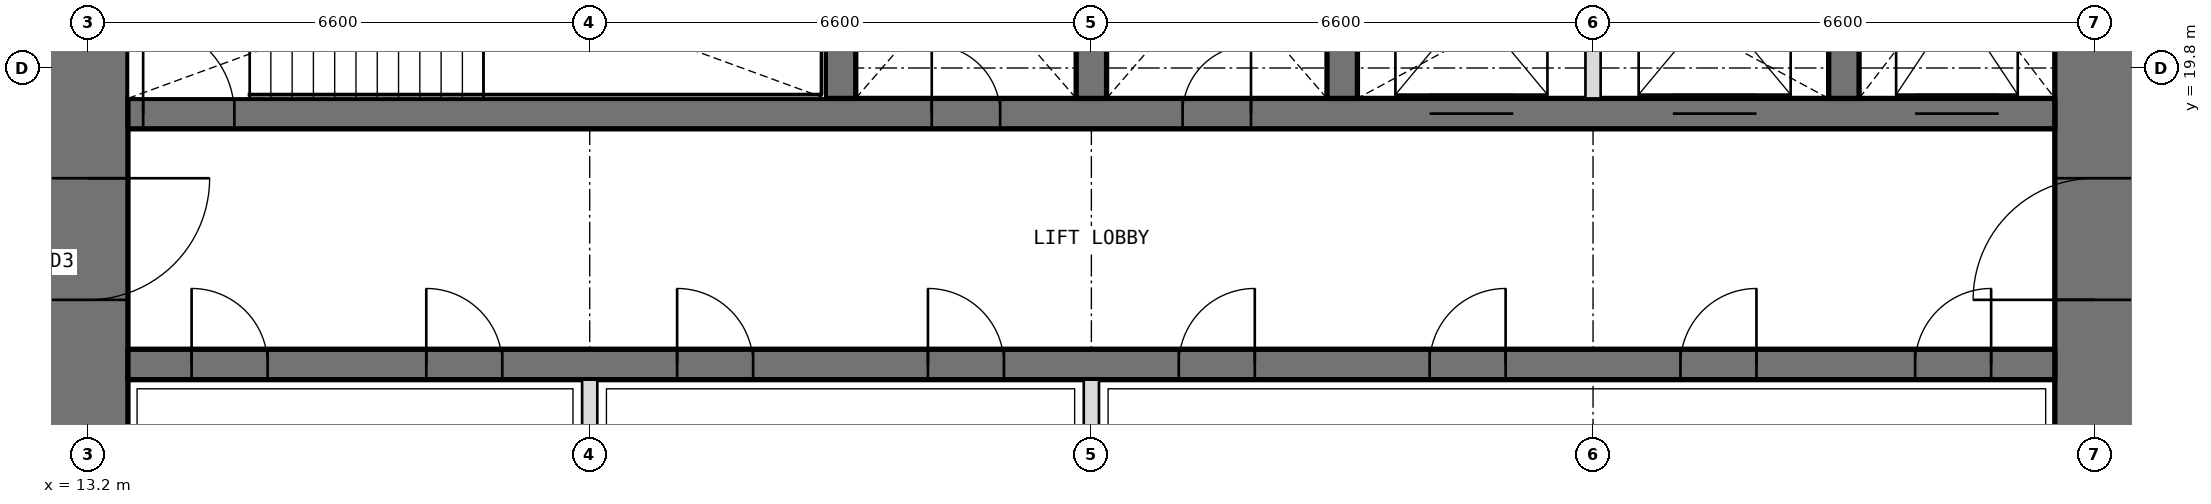
"""IFC4 building model, lengths in metres.
Left out: names, types, materials, properties, quantities, classifications, styles, units other than length and angle.
Written with IfcOpenShell. Run it as: python <this file> out.ifc"""

import sys

from ifc_helpers import new_model, si_unit, direction, frame, frame_2d, origin, place, context, subcontext, project, spatial, rectangle, extrude, element, fill, save


model = new_model("IFC4")
c1 = context("Model", 3, precision=1e-05, world=origin(), true_north=direction((0.0, 1.0)))
c2 = subcontext(c1, "Body", "Model", "MODEL_VIEW")
j1 = project(units=[si_unit("LENGTHUNIT", "METRE"), si_unit("PLANEANGLEUNIT", "RADIAN")], contexts=[c1])
p1 = place(None, origin())
s1 = spatial("IfcSite", under=j1, at=p1, CompositionType="ELEMENT")
p2 = place(p1, origin())
s2 = spatial("IfcBuilding", under=s1, at=p2, CompositionType="ELEMENT")
p3 = place(p2, frame((0.0, 0.0, 189.3)))
s3 = spatial("IfcBuildingStorey", under=s2, at=p3, CompositionType="ELEMENT", Elevation=189.3)
p4 = place(p3, frame((39.6, 13.725, 0.0), z_axis=(0.0, 0.0, 1.0), x_axis=(0.0, 1.0, 0.0)))
e1 = element("IfcWall", 1, at=p4, inside=s3, PredefinedType="SHEAR", context=c2, shape_type="SweptSolid", body=[
    extrude(rectangle(XDim=18.75, YDim=1.05, at=frame_2d((9.375, 0.0))), origin(), (0.0, 0.0, 1.0), 4.2),
])
p5 = place(p4, frame((3.025, 0.0, 0.0)))
e2 = element("IfcOpeningElement", 2, at=p5, cuts=e1, PredefinedType="OPENING", context=c2, shape_type="SweptSolid", body=[
    extrude(rectangle(XDim=1.6, YDim=2.1, at=frame_2d((0.8, 1.05))), frame((0.0, 0.535, 0.0), z_axis=(0.0, -1.0, 0.0), x_axis=(1.0, 0.0, 0.0)), (0.0, 0.0, 1.0), 1.07),
])
p6 = place(p4, frame((13.825, 0.0, 0.0)))
e3 = element("IfcOpeningElement", 3, at=p6, cuts=e1, PredefinedType="OPENING", context=c2, shape_type="SweptSolid", body=[
    extrude(rectangle(XDim=1.6, YDim=2.1, at=frame_2d((0.8, 1.05))), frame((0.0, 0.535, 0.0), z_axis=(0.0, -1.0, 0.0), x_axis=(1.0, 0.0, 0.0)), (0.0, 0.0, 1.0), 1.07),
])
p7 = place(p3, frame((13.2, 32.475, 0.0), z_axis=(0.0, 0.0, 1.0), x_axis=(0.0, -1.0, 0.0)))
e4 = element("IfcWall", 4, at=p7, inside=s3, PredefinedType="SHEAR", context=c2, shape_type="SweptSolid", body=[
    extrude(rectangle(XDim=18.75, YDim=1.05, at=frame_2d((9.375, 0.0))), origin(), (0.0, 0.0, 1.0), 4.2),
])
p8 = place(p7, frame((14.125, 0.0, 0.0)))
e5 = element("IfcOpeningElement", 5, at=p8, cuts=e4, PredefinedType="OPENING", context=c2, shape_type="SweptSolid", body=[
    extrude(rectangle(XDim=1.6, YDim=2.1, at=frame_2d((0.8, 1.05))), frame((0.0, 0.535, 0.0), z_axis=(0.0, -1.0, 0.0), x_axis=(1.0, 0.0, 0.0)), (0.0, 0.0, 1.0), 1.07),
])
p9 = place(p7, frame((3.325, 0.0, 0.0)))
e6 = element("IfcOpeningElement", 6, at=p9, cuts=e4, PredefinedType="OPENING", context=c2, shape_type="SweptSolid", body=[
    extrude(rectangle(XDim=1.6, YDim=2.1, at=frame_2d((0.8, 1.05))), frame((0.0, 0.535, 0.0), z_axis=(0.0, -1.0, 0.0), x_axis=(1.0, 0.0, 0.0)), (0.0, 0.0, 1.0), 1.07),
])
p10 = place(p3, frame((13.725, 15.9, 0.0), z_axis=(0.0, 0.0, 1.0), x_axis=(1.0, 0.0, 0.0)))
e7 = element("IfcWall", 7, at=p10, inside=s3, PredefinedType="SHEAR", context=c2, shape_type="SweptSolid", body=[
    extrude(rectangle(XDim=25.35, YDim=0.4, at=frame_2d((12.675, 0.0))), origin(), (0.0, 0.0, 1.0), 4.2),
])
p11 = place(p10, frame((0.837, 0.0, 0.0)))
e8 = element("IfcOpeningElement", 8, at=p11, cuts=e7, PredefinedType="OPENING", context=c2, shape_type="SweptSolid", body=[
    extrude(rectangle(XDim=1.0, YDim=2.1, at=frame_2d((0.5, 1.05))), frame((0.0, 0.21, 0.0), z_axis=(0.0, -1.0, 0.0), x_axis=(1.0, 0.0, 0.0)), (0.0, 0.0, 1.0), 0.42),
])
p12 = place(p10, frame((3.925, 0.0, 0.0)))
e9 = element("IfcOpeningElement", 9, at=p12, cuts=e7, PredefinedType="OPENING", context=c2, shape_type="SweptSolid", body=[
    extrude(rectangle(XDim=1.0, YDim=2.1, at=frame_2d((0.5, 1.05))), frame((0.0, 0.21, 0.0), z_axis=(0.0, -1.0, 0.0), x_axis=(1.0, 0.0, 0.0)), (0.0, 0.0, 1.0), 0.42),
])
p13 = place(p10, frame((7.225, 0.0, 0.0)))
e10 = element("IfcOpeningElement", 10, at=p13, cuts=e7, PredefinedType="OPENING", context=c2, shape_type="SweptSolid", body=[
    extrude(rectangle(XDim=1.0, YDim=2.1, at=frame_2d((0.5, 1.05))), frame((0.0, 0.21, 0.0), z_axis=(0.0, -1.0, 0.0), x_axis=(1.0, 0.0, 0.0)), (0.0, 0.0, 1.0), 0.42),
])
p14 = place(p10, frame((10.525, 0.0, 0.0)))
e11 = element("IfcOpeningElement", 11, at=p14, cuts=e7, PredefinedType="OPENING", context=c2, shape_type="SweptSolid", body=[
    extrude(rectangle(XDim=1.0, YDim=2.1, at=frame_2d((0.5, 1.05))), frame((0.0, 0.21, 0.0), z_axis=(0.0, -1.0, 0.0), x_axis=(1.0, 0.0, 0.0)), (0.0, 0.0, 1.0), 0.42),
])
p15 = place(p10, frame((13.825, 0.0, 0.0)))
e12 = element("IfcOpeningElement", 12, at=p15, cuts=e7, PredefinedType="OPENING", context=c2, shape_type="SweptSolid", body=[
    extrude(rectangle(XDim=1.0, YDim=2.1, at=frame_2d((0.5, 1.05))), frame((0.0, 0.21, 0.0), z_axis=(0.0, -1.0, 0.0), x_axis=(1.0, 0.0, 0.0)), (0.0, 0.0, 1.0), 0.42),
])
p16 = place(p10, frame((17.125, 0.0, 0.0)))
e13 = element("IfcOpeningElement", 13, at=p16, cuts=e7, PredefinedType="OPENING", context=c2, shape_type="SweptSolid", body=[
    extrude(rectangle(XDim=1.0, YDim=2.1, at=frame_2d((0.5, 1.05))), frame((0.0, 0.21, 0.0), z_axis=(0.0, -1.0, 0.0), x_axis=(1.0, 0.0, 0.0)), (0.0, 0.0, 1.0), 0.42),
])
p17 = place(p10, frame((20.425, 0.0, 0.0)))
e14 = element("IfcOpeningElement", 14, at=p17, cuts=e7, PredefinedType="OPENING", context=c2, shape_type="SweptSolid", body=[
    extrude(rectangle(XDim=1.0, YDim=2.1, at=frame_2d((0.5, 1.05))), frame((0.0, 0.21, 0.0), z_axis=(0.0, -1.0, 0.0), x_axis=(1.0, 0.0, 0.0)), (0.0, 0.0, 1.0), 0.42),
])
p18 = place(p10, frame((23.512, 0.0, 0.0)))
e15 = element("IfcOpeningElement", 15, at=p18, cuts=e7, PredefinedType="OPENING", context=c2, shape_type="SweptSolid", body=[
    extrude(rectangle(XDim=1.0, YDim=2.1, at=frame_2d((0.5, 1.05))), frame((0.0, 0.21, 0.0), z_axis=(0.0, -1.0, 0.0), x_axis=(1.0, 0.0, 0.0)), (0.0, 0.0, 1.0), 0.42),
])
p19 = place(p3, frame((13.725, 19.2, 0.0), z_axis=(0.0, 0.0, 1.0), x_axis=(1.0, 0.0, 0.0)))
e16 = element("IfcWall", 16, at=p19, inside=s3, PredefinedType="SHEAR", context=c2, shape_type="SweptSolid", body=[
    extrude(rectangle(XDim=25.35, YDim=0.4, at=frame_2d((12.675, 0.0))), origin(), (0.0, 0.0, 1.0), 4.2),
])
p20 = place(p19, frame((10.575, 0.0, 0.0)))
e17 = element("IfcOpeningElement", 17, at=p20, cuts=e16, PredefinedType="OPENING", context=c2, shape_type="SweptSolid", body=[
    extrude(rectangle(XDim=0.9, YDim=2.1, at=frame_2d((0.45, 1.05))), frame((0.0, 0.21, 0.0), z_axis=(0.0, -1.0, 0.0), x_axis=(1.0, 0.0, 0.0)), (0.0, 0.0, 1.0), 0.42),
])
p21 = place(p19, frame((13.875, 0.0, 0.0)))
e18 = element("IfcOpeningElement", 18, at=p21, cuts=e16, PredefinedType="OPENING", context=c2, shape_type="SweptSolid", body=[
    extrude(rectangle(XDim=0.9, YDim=2.1, at=frame_2d((0.45, 1.05))), frame((0.0, 0.21, 0.0), z_axis=(0.0, -1.0, 0.0), x_axis=(1.0, 0.0, 0.0)), (0.0, 0.0, 1.0), 0.42),
])
p22 = place(p19, frame((0.2, 0.0, 0.0)))
e19 = element("IfcOpeningElement", 19, at=p22, cuts=e16, PredefinedType="OPENING", context=c2, shape_type="SweptSolid", body=[
    extrude(rectangle(XDim=1.2, YDim=2.1, at=frame_2d((0.6, 1.05))), frame((0.0, 0.21, 0.0), z_axis=(0.0, -1.0, 0.0), x_axis=(1.0, 0.0, 0.0)), (0.0, 0.0, 1.0), 0.42),
])
p23 = place(p19, frame((23.512, 0.0, 0.0)))
e20 = element("IfcOpeningElement", 20, at=p23, cuts=e16, PredefinedType="OPENING", context=c2, shape_type="SweptSolid", body=[
    extrude(rectangle(XDim=1.1, YDim=2.1, at=frame_2d((0.55, 1.05))), frame((0.0, 0.21, 0.0), z_axis=(0.0, -1.0, 0.0), x_axis=(1.0, 0.0, 0.0)), (0.0, 0.0, 1.0), 0.42),
])
p24 = place(p19, frame((17.125, 0.0, 0.0)))
e21 = element("IfcOpeningElement", 21, at=p24, cuts=e16, PredefinedType="OPENING", context=c2, shape_type="SweptSolid", body=[
    extrude(rectangle(XDim=1.1, YDim=2.1, at=frame_2d((0.55, 1.05))), frame((0.0, 0.21, 0.0), z_axis=(0.0, -1.0, 0.0), x_axis=(1.0, 0.0, 0.0)), (0.0, 0.0, 1.0), 0.42),
])
p25 = place(p19, frame((20.325, 0.0, 0.0)))
e22 = element("IfcOpeningElement", 22, at=p25, cuts=e16, PredefinedType="OPENING", context=c2, shape_type="SweptSolid", body=[
    extrude(rectangle(XDim=1.1, YDim=2.1, at=frame_2d((0.55, 1.05))), frame((0.0, 0.21, 0.0), z_axis=(0.0, -1.0, 0.0), x_axis=(1.0, 0.0, 0.0)), (0.0, 0.0, 1.0), 0.42),
])
for number, where, z_axis, x_axis in (
    (23, (23.1, 19.4, 0.0), (0.0, 0.0, 1.0), (0.0, 1.0, 0.0)),
    (24, (26.4, 19.4, 0.0), (0.0, 0.0, 1.0), (0.0, 1.0, 0.0)),
    (25, (29.7, 19.4, 0.0), (0.0, 0.0, 1.0), (0.0, 1.0, 0.0)),
    (26, (36.3, 19.4, 0.0), (0.0, 0.0, 1.0), (0.0, 1.0, 0.0)),
):
    element("IfcWall", number, at=place(p3, frame(where, z_axis=z_axis, x_axis=x_axis)), inside=s3, PredefinedType="SHEAR", context=c2, shape_type="SweptSolid", body=[
        extrude(rectangle(XDim=3.35, YDim=0.4, at=frame_2d((1.675, 0.0))), origin(), (0.0, 0.0, 1.0), 4.2),
    ])
for number, where, z_axis, x_axis in (
    (27, (19.8, 13.725, 0.0), (0.0, 0.0, 1.0), (0.0, 1.0, 0.0)),
    (28, (26.4, 13.725, 0.0), (0.0, 0.0, 1.0), (0.0, 1.0, 0.0)),
):
    element("IfcWall", number, at=place(p3, frame(where, z_axis=z_axis, x_axis=x_axis)), inside=s3, PredefinedType="PARTITIONING", context=c2, shape_type="SweptSolid", body=[
        extrude(rectangle(XDim=1.975, YDim=0.2, at=frame_2d((0.987, 0.0))), origin(), (0.0, 0.0, 1.0), 4.2),
    ])
p26 = place(p3, frame((33.0, 19.4, 0.0), z_axis=(0.0, 0.0, 1.0), x_axis=(0.0, 1.0, 0.0)))
e29 = element("IfcWall", 29, at=p26, inside=s3, PredefinedType="PARTITIONING", context=c2, shape_type="SweptSolid", body=[
    extrude(rectangle(XDim=3.35, YDim=0.2, at=frame_2d((1.675, 0.0))), origin(), (0.0, 0.0, 1.0), 4.2),
])
p27 = place(p20, origin())
e30 = element("IfcDoor", 30, at=p27, inside=s3, OperationType="SINGLE_SWING_LEFT", PredefinedType="DOOR", context=c2, shape_type="SweptSolid", body=[
    extrude(rectangle(XDim=0.9, YDim=2.1, at=frame_2d((0.45, 1.05))), frame((0.0, 0.025, 0.0), z_axis=(0.0, -1.0, 0.0), x_axis=(1.0, 0.0, 0.0)), (0.0, 0.0, 1.0), 0.05),
])
fill(e17, e30)
p28 = place(p21, origin())
e31 = element("IfcDoor", 31, at=p28, inside=s3, OperationType="SINGLE_SWING_RIGHT", PredefinedType="DOOR", context=c2, shape_type="SweptSolid", body=[
    extrude(rectangle(XDim=0.9, YDim=2.1, at=frame_2d((0.45, 1.05))), frame((0.0, 0.025, 0.0), z_axis=(0.0, -1.0, 0.0), x_axis=(1.0, 0.0, 0.0)), (0.0, 0.0, 1.0), 0.05),
])
fill(e18, e31)
p29 = place(p11, origin())
e32 = element("IfcDoor", 32, at=p29, inside=s3, OperationType="SINGLE_SWING_LEFT", PredefinedType="DOOR", context=c2, shape_type="SweptSolid", body=[
    extrude(rectangle(XDim=1.0, YDim=2.1, at=frame_2d((0.5, 1.05))), frame((0.0, 0.025, 0.0), z_axis=(0.0, -1.0, 0.0), x_axis=(1.0, 0.0, 0.0)), (0.0, 0.0, 1.0), 0.05),
])
fill(e8, e32)
p30 = place(p12, origin())
e33 = element("IfcDoor", 33, at=p30, inside=s3, OperationType="SINGLE_SWING_LEFT", PredefinedType="DOOR", context=c2, shape_type="SweptSolid", body=[
    extrude(rectangle(XDim=1.0, YDim=2.1, at=frame_2d((0.5, 1.05))), frame((0.0, 0.025, 0.0), z_axis=(0.0, -1.0, 0.0), x_axis=(1.0, 0.0, 0.0)), (0.0, 0.0, 1.0), 0.05),
])
fill(e9, e33)
p31 = place(p13, origin())
e34 = element("IfcDoor", 34, at=p31, inside=s3, OperationType="SINGLE_SWING_LEFT", PredefinedType="DOOR", context=c2, shape_type="SweptSolid", body=[
    extrude(rectangle(XDim=1.0, YDim=2.1, at=frame_2d((0.5, 1.05))), frame((0.0, 0.025, 0.0), z_axis=(0.0, -1.0, 0.0), x_axis=(1.0, 0.0, 0.0)), (0.0, 0.0, 1.0), 0.05),
])
fill(e10, e34)
p32 = place(p14, origin())
e35 = element("IfcDoor", 35, at=p32, inside=s3, OperationType="SINGLE_SWING_LEFT", PredefinedType="DOOR", context=c2, shape_type="SweptSolid", body=[
    extrude(rectangle(XDim=1.0, YDim=2.1, at=frame_2d((0.5, 1.05))), frame((0.0, 0.025, 0.0), z_axis=(0.0, -1.0, 0.0), x_axis=(1.0, 0.0, 0.0)), (0.0, 0.0, 1.0), 0.05),
])
fill(e11, e35)
p33 = place(p15, origin())
e36 = element("IfcDoor", 36, at=p33, inside=s3, OperationType="SINGLE_SWING_RIGHT", PredefinedType="DOOR", context=c2, shape_type="SweptSolid", body=[
    extrude(rectangle(XDim=1.0, YDim=2.1, at=frame_2d((0.5, 1.05))), frame((0.0, 0.025, 0.0), z_axis=(0.0, -1.0, 0.0), x_axis=(1.0, 0.0, 0.0)), (0.0, 0.0, 1.0), 0.05),
])
fill(e12, e36)
p34 = place(p16, origin())
e37 = element("IfcDoor", 37, at=p34, inside=s3, OperationType="SINGLE_SWING_RIGHT", PredefinedType="DOOR", context=c2, shape_type="SweptSolid", body=[
    extrude(rectangle(XDim=1.0, YDim=2.1, at=frame_2d((0.5, 1.05))), frame((0.0, 0.025, 0.0), z_axis=(0.0, -1.0, 0.0), x_axis=(1.0, 0.0, 0.0)), (0.0, 0.0, 1.0), 0.05),
])
fill(e13, e37)
p35 = place(p17, origin())
e38 = element("IfcDoor", 38, at=p35, inside=s3, OperationType="SINGLE_SWING_RIGHT", PredefinedType="DOOR", context=c2, shape_type="SweptSolid", body=[
    extrude(rectangle(XDim=1.0, YDim=2.1, at=frame_2d((0.5, 1.05))), frame((0.0, 0.025, 0.0), z_axis=(0.0, -1.0, 0.0), x_axis=(1.0, 0.0, 0.0)), (0.0, 0.0, 1.0), 0.05),
])
fill(e14, e38)
p36 = place(p18, origin())
e39 = element("IfcDoor", 39, at=p36, inside=s3, OperationType="SINGLE_SWING_RIGHT", PredefinedType="DOOR", context=c2, shape_type="SweptSolid", body=[
    extrude(rectangle(XDim=1.0, YDim=2.1, at=frame_2d((0.5, 1.05))), frame((0.0, 0.025, 0.0), z_axis=(0.0, -1.0, 0.0), x_axis=(1.0, 0.0, 0.0)), (0.0, 0.0, 1.0), 0.05),
])
fill(e15, e39)
p37 = place(p22, origin())
e40 = element("IfcDoor", 40, at=p37, inside=s3, OperationType="SINGLE_SWING_LEFT", PredefinedType="DOOR", context=c2, shape_type="SweptSolid", body=[
    extrude(rectangle(XDim=1.2, YDim=2.1, at=frame_2d((0.6, 1.05))), frame((0.0, 0.025, 0.0), z_axis=(0.0, -1.0, 0.0), x_axis=(1.0, 0.0, 0.0)), (0.0, 0.0, 1.0), 0.05),
])
fill(e19, e40)
p38 = place(p8, origin())
e41 = element("IfcDoor", 41, at=p38, inside=s3, OperationType="DOUBLE_DOOR_DOUBLE_SWING", PredefinedType="DOOR", context=c2, shape_type="SweptSolid", body=[
    extrude(rectangle(XDim=1.6, YDim=2.1, at=frame_2d((0.8, 1.05))), frame((0.0, 0.025, 0.0), z_axis=(0.0, -1.0, 0.0), x_axis=(1.0, 0.0, 0.0)), (0.0, 0.0, 1.0), 0.05),
])
fill(e5, e41)
p39 = place(p5, origin())
e42 = element("IfcDoor", 42, at=p39, inside=s3, OperationType="DOUBLE_DOOR_DOUBLE_SWING", PredefinedType="DOOR", context=c2, shape_type="SweptSolid", body=[
    extrude(rectangle(XDim=1.6, YDim=2.1, at=frame_2d((0.8, 1.05))), frame((0.0, 0.025, 0.0), z_axis=(0.0, -1.0, 0.0), x_axis=(1.0, 0.0, 0.0)), (0.0, 0.0, 1.0), 0.05),
])
fill(e2, e42)
p40 = place(p23, origin())
e43 = element("IfcDoor", 43, at=p40, inside=s3, OperationType="DOUBLE_DOOR_SLIDING", PredefinedType="DOOR", context=c2, shape_type="SweptSolid", body=[
    extrude(rectangle(XDim=1.1, YDim=2.1, at=frame_2d((0.55, 1.05))), frame((0.0, 0.025, 0.0), z_axis=(0.0, -1.0, 0.0), x_axis=(1.0, 0.0, 0.0)), (0.0, 0.0, 1.0), 0.05),
])
fill(e20, e43)
p41 = place(p24, origin())
e44 = element("IfcDoor", 44, at=p41, inside=s3, OperationType="DOUBLE_DOOR_SLIDING", PredefinedType="DOOR", context=c2, shape_type="SweptSolid", body=[
    extrude(rectangle(XDim=1.1, YDim=2.1, at=frame_2d((0.55, 1.05))), frame((0.0, 0.025, 0.0), z_axis=(0.0, -1.0, 0.0), x_axis=(1.0, 0.0, 0.0)), (0.0, 0.0, 1.0), 0.05),
])
fill(e21, e44)
p42 = place(p25, origin())
e45 = element("IfcDoor", 45, at=p42, inside=s3, OperationType="DOUBLE_DOOR_SLIDING", PredefinedType="DOOR", context=c2, shape_type="SweptSolid", body=[
    extrude(rectangle(XDim=1.1, YDim=2.1, at=frame_2d((0.55, 1.05))), frame((0.0, 0.025, 0.0), z_axis=(0.0, -1.0, 0.0), x_axis=(1.0, 0.0, 0.0)), (0.0, 0.0, 1.0), 0.05),
])
fill(e22, e45)
save(model, sys.argv[1])
